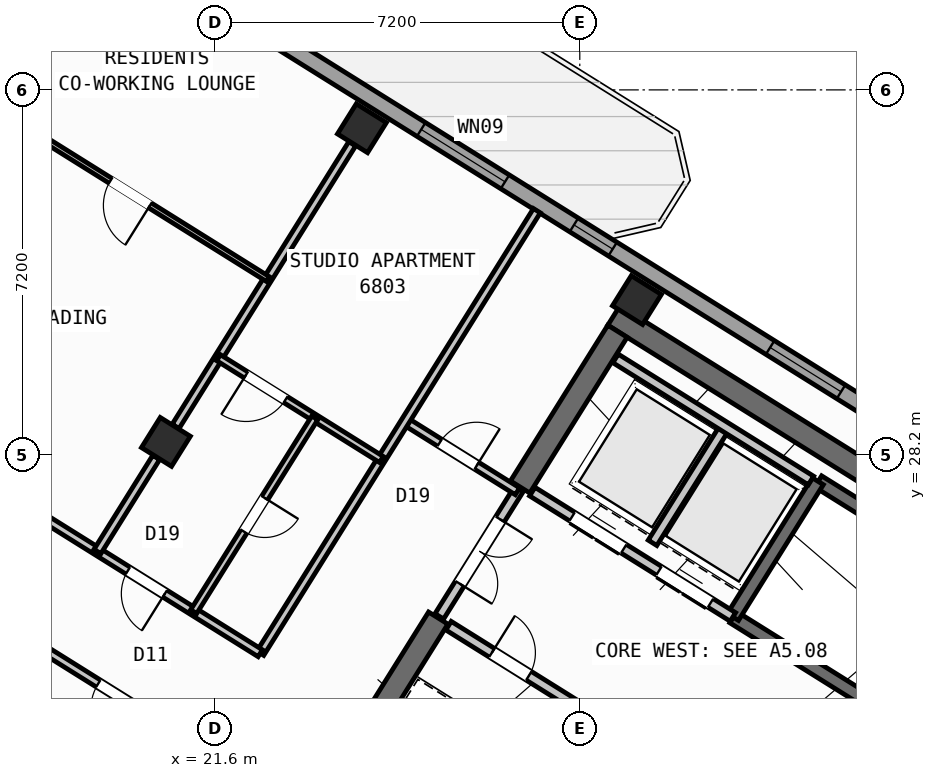
"""IFC4 building model, lengths in metres.
Left out: names, types, materials, properties, quantities, classifications, styles, units other than length and angle.
Written with IfcOpenShell. Run it as: python <this file> out.ifc"""

import sys

from ifc_helpers import new_model, si_unit, direction, frame, frame_2d, origin, origin_2d, place, context, subcontext, project, spatial, rectangle, hollow_rectangle, extrude, source, transform, mapped, element, fill, save


model = new_model("IFC4")
c1 = context("Model", 3, precision=1e-05, world=origin(), true_north=direction((0.0, 1.0)))
c2 = subcontext(c1, "Body", "Model", "MODEL_VIEW")
j1 = project(units=[si_unit("LENGTHUNIT", "METRE"), si_unit("PLANEANGLEUNIT", "RADIAN")], contexts=[c1])
p1 = place(None, origin())
s1 = spatial("IfcSite", under=j1, at=p1, CompositionType="ELEMENT")
p2 = place(p1, origin())
s2 = spatial("IfcBuilding", under=s1, at=p2, CompositionType="ELEMENT")
p3 = place(p2, frame((0.0, 0.0, 270.0)))
s3 = spatial("IfcBuildingStorey", under=s2, at=p3, CompositionType="ELEMENT", Elevation=270.0)
p4 = place(p3, frame((40.531, 24.036, 0.0), z_axis=(0.0, 0.0, 1.0), x_axis=(-0.848048787466, 0.529918157905, 0.0)))
e1 = element("IfcWall", 1, at=p4, inside=s3, PredefinedType="SHEAR", context=c2, shape_type="SweptSolid", body=[
    extrude(rectangle(XDim=13.04, YDim=0.45, at=frame_2d((6.52, 0.0))), origin(), (0.0, 0.0, 1.0), 3.35),
])
p5 = place(p3, frame((29.544, 30.636, 0.0), z_axis=(0.0, 0.0, 1.0), x_axis=(-0.529902075036, -0.848058836916, 0.0)))
e2 = element("IfcWall", 2, at=p5, inside=s3, PredefinedType="SHEAR", context=c2, shape_type="SweptSolid", body=[
    extrude(rectangle(XDim=3.625, YDim=0.45, at=frame_2d((1.812, 0.0))), origin(), (0.0, 0.0, 1.0), 3.35),
])
p6 = place(p3, frame((26.007, 24.976, 0.0), z_axis=(0.0, 0.0, 1.0), x_axis=(-0.529931155655, -0.848040665456, 0.0)))
e3 = element("IfcWall", 3, at=p6, inside=s3, PredefinedType="SHEAR", context=c2, shape_type="SweptSolid", body=[
    extrude(rectangle(XDim=6.475, YDim=0.45, at=frame_2d((3.238, 0.0))), origin(), (0.0, 0.0, 1.0), 3.35),
])
m1 = source(origin(), c2, "Body", "SweptSolid", [
    extrude(hollow_rectangle(XDim=0.7, YDim=0.7, WallThickness=0.028, at=origin_2d()), origin(), (0.0, 0.0, 1.0), 3.6),
])
for number, where, z_axis, x_axis in (
    (4, (29.928, 31.251, 0.0), (0.0, 0.0, 1.0), (-0.848, 0.53, 0.0)),
    (5, (24.5, 34.643, 0.0), (0.0, 0.0, 1.0), (-0.848, 0.53, 0.0)),
    (6, (20.632, 28.452, 0.0), (0.0, 0.0, 1.0), (-0.848, 0.53, 0.0)),
):
    element("IfcColumn", number, at=place(p3, frame(where, z_axis=z_axis, x_axis=x_axis)), inside=s3, PredefinedType="COLUMN", context=c2, shape_type="MappedRepresentation", body=[
        mapped(m1, transform((0.0, 0.0, 0.0), scale=1.0)),
    ])
p7 = place(p3, frame((14.138, 41.825, 0.0), z_axis=(0.0, 0.0, 1.0), x_axis=(0.848046498049, -0.529921821731, 0.0)))
e7 = element("IfcWall", 7, at=p7, inside=s3, PredefinedType="STANDARD", context=c2, shape_type="SweptSolid", body=[
    extrude(rectangle(XDim=31.588, YDim=0.32, at=frame_2d((15.794, 0.0))), origin(), (0.0, 0.0, 1.0), 3.35),
])
p8 = place(p7, frame((3.46, 0.0, 0.0)))
e8 = element("IfcOpeningElement", 8, at=p8, cuts=e7, PredefinedType="OPENING", context=c2, shape_type="SweptSolid", body=[
    extrude(rectangle(XDim=1.05, YDim=2.15, at=frame_2d((0.525, 1.075))), frame((0.0, 0.17, 0.0), z_axis=(0.0, -1.0, 0.0), x_axis=(1.0, 0.0, 0.0)), (0.0, 0.0, 1.0), 0.34),
])
p9 = place(p7, frame((0.831, 0.0, 1.0)))
e9 = element("IfcOpeningElement", 9, at=p9, cuts=e7, PredefinedType="OPENING", context=c2, shape_type="SweptSolid", body=[
    extrude(rectangle(XDim=0.9, YDim=1.25, at=frame_2d((0.45, 0.625))), frame((0.0, 0.17, 0.0), z_axis=(0.0, -1.0, 0.0), x_axis=(1.0, 0.0, 0.0)), (0.0, 0.0, 1.0), 0.34),
])
p10 = place(p7, frame((8.719, 0.0, 0.9)))
e10 = element("IfcOpeningElement", 10, at=p10, cuts=e7, PredefinedType="OPENING", context=c2, shape_type="SweptSolid", body=[
    extrude(rectangle(XDim=1.35, YDim=1.45, at=frame_2d((0.675, 0.725))), frame((0.0, 0.17, 0.0), z_axis=(0.0, -1.0, 0.0), x_axis=(1.0, 0.0, 0.0)), (0.0, 0.0, 1.0), 0.34),
])
p11 = place(p7, frame((13.599, 0.0, 0.95)))
e11 = element("IfcOpeningElement", 11, at=p11, cuts=e7, PredefinedType="OPENING", context=c2, shape_type="SweptSolid", body=[
    extrude(rectangle(XDim=1.95, YDim=1.35, at=frame_2d((0.975, 0.675))), frame((0.0, 0.17, 0.0), z_axis=(0.0, -1.0, 0.0), x_axis=(1.0, 0.0, 0.0)), (0.0, 0.0, 1.0), 0.34),
])
p12 = place(p7, frame((17.154, 0.0, 1.0)))
e12 = element("IfcOpeningElement", 12, at=p12, cuts=e7, PredefinedType="OPENING", context=c2, shape_type="SweptSolid", body=[
    extrude(rectangle(XDim=0.9, YDim=1.25, at=frame_2d((0.45, 0.625))), frame((0.0, 0.17, 0.0), z_axis=(0.0, -1.0, 0.0), x_axis=(1.0, 0.0, 0.0)), (0.0, 0.0, 1.0), 0.34),
])
p13 = place(p7, frame((21.719, 0.0, 0.9)))
e13 = element("IfcOpeningElement", 13, at=p13, cuts=e7, PredefinedType="OPENING", context=c2, shape_type="SweptSolid", body=[
    extrude(rectangle(XDim=1.65, YDim=1.45, at=frame_2d((0.825, 0.725))), frame((0.0, 0.17, 0.0), z_axis=(0.0, -1.0, 0.0), x_axis=(1.0, 0.0, 0.0)), (0.0, 0.0, 1.0), 0.34),
])
p14 = place(p7, frame((27.419, 0.0, 0.9)))
e14 = element("IfcOpeningElement", 14, at=p14, cuts=e7, PredefinedType="OPENING", context=c2, shape_type="SweptSolid", body=[
    extrude(rectangle(XDim=1.65, YDim=1.45, at=frame_2d((0.825, 0.725))), frame((0.0, 0.17, 0.0), z_axis=(0.0, -1.0, 0.0), x_axis=(1.0, 0.0, 0.0)), (0.0, 0.0, 1.0), 0.34),
])
p15 = place(p3, frame((39.721, 23.788, 0.0), z_axis=(0.0, 0.0, 1.0), x_axis=(-0.848054434086, 0.529909121291, 0.0)))
e15 = element("IfcWall", 15, at=p15, inside=s3, PredefinedType="SHEAR", context=c2, shape_type="SweptSolid", body=[
    extrude(rectangle(XDim=7.33, YDim=0.26, at=frame_2d((3.665, 0.0))), origin(), (0.0, 0.0, 1.0), 3.35),
])
p16 = place(p3, frame((38.046, 21.108, 0.0), z_axis=(0.0, 0.0, 1.0), x_axis=(-0.848054434086, 0.529909121291, 0.0)))
e16 = element("IfcWall", 16, at=p16, inside=s3, PredefinedType="SHEAR", context=c2, shape_type="SweptSolid", body=[
    extrude(rectangle(XDim=7.33, YDim=0.26, at=frame_2d((3.665, 0.0))), origin(), (0.0, 0.0, 1.0), 3.35),
])
p17 = place(p16, frame((0.22, 0.0, 0.0)))
e17 = element("IfcOpeningElement", 17, at=p17, cuts=e16, PredefinedType="OPENING", context=c2, shape_type="SweptSolid", body=[
    extrude(rectangle(XDim=1.1, YDim=2.1, at=frame_2d((0.55, 1.05))), frame((0.0, 0.14, 0.0), z_axis=(0.0, -1.0, 0.0), x_axis=(1.0, 0.0, 0.0)), (0.0, 0.0, 1.0), 0.28),
])
p18 = place(p3, frame((33.496, 27.677, 0.0), z_axis=(0.0, 0.0, 1.0), x_axis=(-0.529908658664, -0.84805472316, 0.0)))
e18 = element("IfcWall", 18, at=p18, inside=s3, PredefinedType="SHEAR", context=c2, shape_type="SweptSolid", body=[
    extrude(rectangle(XDim=3.16, YDim=0.26, at=frame_2d((1.58, 0.0))), origin(), (0.0, 0.0, 1.0), 3.35),
])
p19 = place(p3, frame((31.822, 24.998, 0.0), z_axis=(0.0, 0.0, 1.0), x_axis=(-0.848054125777, 0.529909614701, 0.0)))
e19 = element("IfcWall", 19, at=p19, inside=s3, PredefinedType="STANDARD", context=c2, shape_type="SweptSolid", body=[
    extrude(rectangle(XDim=4.668, YDim=0.2, at=frame_2d((2.334, 0.0))), origin(), (0.0, 0.0, 1.0), 3.34),
])
p20 = place(p19, frame((0.52, 0.0, 0.0)))
e20 = element("IfcOpeningElement", 20, at=p20, cuts=e19, PredefinedType="OPENING", context=c2, shape_type="SweptSolid", body=[
    extrude(rectangle(XDim=1.2, YDim=2.15, at=frame_2d((0.6, 1.075))), frame((0.0, 0.11, 0.0), z_axis=(0.0, -1.0, 0.0), x_axis=(1.0, 0.0, 0.0)), (0.0, 0.0, 1.0), 0.22),
])
p21 = place(p19, frame((2.54, 0.0, 0.0)))
e21 = element("IfcOpeningElement", 21, at=p21, cuts=e19, PredefinedType="OPENING", context=c2, shape_type="SweptSolid", body=[
    extrude(rectangle(XDim=1.2, YDim=2.15, at=frame_2d((0.6, 1.075))), frame((0.0, 0.11, 0.0), z_axis=(0.0, -1.0, 0.0), x_axis=(1.0, 0.0, 0.0)), (0.0, 0.0, 1.0), 0.22),
])
p22 = place(p3, frame((31.645, 28.716, 0.0), z_axis=(0.0, 0.0, 1.0), x_axis=(-0.52986693015, -0.848080795876, 0.0)))
e22 = element("IfcWall", 22, at=p22, inside=s3, PredefinedType="STANDARD", context=c2, shape_type="SweptSolid", body=[
    extrude(rectangle(XDim=2.66, YDim=0.2, at=frame_2d((1.33, 0.0))), origin(), (0.0, 0.0, 1.0), 3.34),
])
p23 = place(p3, frame((33.363, 27.69, 0.0), z_axis=(0.0, 0.0, 1.0), x_axis=(-0.84804957148, 0.529916903215, 0.0)))
e23 = element("IfcWall", 23, at=p23, inside=s3, PredefinedType="STANDARD", context=c2, shape_type="SweptSolid", body=[
    extrude(rectangle(XDim=4.548, YDim=0.2, at=frame_2d((2.274, 0.0))), origin(), (0.0, 0.0, 1.0), 3.34),
])
p24 = place(p3, frame((31.525, 21.504, 0.0), z_axis=(0.0, 0.0, 1.0), x_axis=(-0.848042066329, 0.529928913853, 0.0)))
e24 = element("IfcWall", 24, at=p24, inside=s3, PredefinedType="STANDARD", context=c2, shape_type="SweptSolid", body=[
    extrude(rectangle(XDim=6.268, YDim=0.2, at=frame_2d((3.134, 0.0))), origin(), (0.0, 0.0, 1.0), 3.34),
])
p25 = place(p24, frame((4.4, 0.0, 0.0)))
e25 = element("IfcOpeningElement", 25, at=p25, cuts=e24, PredefinedType="OPENING", context=c2, shape_type="SweptSolid", body=[
    extrude(rectangle(XDim=0.86, YDim=2.05, at=frame_2d((0.43, 1.025))), frame((0.0, 0.11, 0.0), z_axis=(0.0, -1.0, 0.0), x_axis=(1.0, 0.0, 0.0)), (0.0, 0.0, 1.0), 0.22),
])
p26 = place(p24, frame((0.35, 0.0, 0.0)))
e26 = element("IfcOpeningElement", 26, at=p26, cuts=e24, PredefinedType="OPENING", context=c2, shape_type="SweptSolid", body=[
    extrude(rectangle(XDim=0.86, YDim=2.05, at=frame_2d((0.43, 1.025))), frame((0.0, 0.11, 0.0), z_axis=(0.0, -1.0, 0.0), x_axis=(1.0, 0.0, 0.0)), (0.0, 0.0, 1.0), 0.22),
])
p27 = place(p3, frame((27.596, 27.52, 0.0), z_axis=(0.0, 0.0, 1.0), x_axis=(-0.529865479138, -0.848081702443, 0.0)))
e27 = element("IfcWall", 27, at=p27, inside=s3, PredefinedType="STANDARD", context=c2, shape_type="SweptSolid", body=[
    extrude(rectangle(XDim=2.96, YDim=0.2, at=frame_2d((1.48, 0.0))), origin(), (0.0, 0.0, 1.0), 3.34),
])
p28 = place(p27, frame((0.7, 0.0, 0.0)))
e28 = element("IfcOpeningElement", 28, at=p28, cuts=e27, PredefinedType="OPENING", context=c2, shape_type="SweptSolid", body=[
    extrude(rectangle(XDim=1.5, YDim=2.15, at=frame_2d((0.75, 1.075))), frame((0.0, 0.11, 0.0), z_axis=(0.0, -1.0, 0.0), x_axis=(1.0, 0.0, 0.0)), (0.0, 0.0, 1.0), 0.22),
])
p29 = place(p3, frame((27.57, 27.478, 0.0), z_axis=(0.0, 0.0, 1.0), x_axis=(-0.848050851465, 0.529914854792, 0.0)))
e29 = element("IfcWall", 29, at=p29, inside=s3, PredefinedType="PARTITIONING", context=c2, shape_type="SweptSolid", body=[
    extrude(rectangle(XDim=2.61, YDim=0.16, at=frame_2d((1.305, 0.0))), origin(), (0.0, 0.0, 1.0), 3.34),
])
p30 = place(p29, frame((0.95, 0.0, 0.0)))
e30 = element("IfcOpeningElement", 30, at=p30, cuts=e29, PredefinedType="OPENING", context=c2, shape_type="SweptSolid", body=[
    extrude(rectangle(XDim=0.86, YDim=2.05, at=frame_2d((0.43, 1.025))), frame((0.0, 0.09, 0.0), z_axis=(0.0, -1.0, 0.0), x_axis=(1.0, 0.0, 0.0)), (0.0, 0.0, 1.0), 0.18),
])
p31 = place(p3, frame((27.953, 33.016, 0.0), z_axis=(0.0, 0.0, 1.0), x_axis=(-0.529909450694, -0.848054228257, 0.0)))
e31 = element("IfcWall", 31, at=p31, inside=s3, PredefinedType="PARTITIONING", context=c2, shape_type="SweptSolid", body=[
    extrude(rectangle(XDim=10.3, YDim=0.16, at=frame_2d((5.15, 0.0))), origin(), (0.0, 0.0, 1.0), 3.34),
])
p32 = place(p3, frame((22.495, 24.281, 0.0), z_axis=(0.0, 0.0, 1.0), x_axis=(-0.848052408131, 0.529912363569, 0.0)))
e32 = element("IfcWall", 32, at=p32, inside=s3, PredefinedType="PARTITIONING", context=c2, shape_type="SweptSolid", body=[
    extrude(rectangle(XDim=16.73, YDim=0.16, at=frame_2d((8.365, 0.0))), origin(), (0.0, 0.0, 1.0), 3.34),
])
p33 = place(p32, frame((2.22, 0.0, 0.0)))
e33 = element("IfcOpeningElement", 33, at=p33, cuts=e32, PredefinedType="OPENING", context=c2, shape_type="SweptSolid", body=[
    extrude(rectangle(XDim=0.86, YDim=2.05, at=frame_2d((0.43, 1.025))), frame((0.0, 0.09, 0.0), z_axis=(0.0, -1.0, 0.0), x_axis=(1.0, 0.0, 0.0)), (0.0, 0.0, 1.0), 0.18),
])
p34 = place(p32, frame((6.49, 0.0, 0.0)))
e34 = element("IfcOpeningElement", 34, at=p34, cuts=e32, PredefinedType="OPENING", context=c2, shape_type="SweptSolid", body=[
    extrude(rectangle(XDim=1.0, YDim=2.1, at=frame_2d((0.5, 1.05))), frame((0.0, 0.09, 0.0), z_axis=(0.0, -1.0, 0.0), x_axis=(1.0, 0.0, 0.0)), (0.0, 0.0, 1.0), 0.18),
])
p35 = place(p32, frame((14.76, 0.0, 0.0)))
e35 = element("IfcOpeningElement", 35, at=p35, cuts=e32, PredefinedType="OPENING", context=c2, shape_type="SweptSolid", body=[
    extrude(rectangle(XDim=1.0, YDim=2.1, at=frame_2d((0.5, 1.05))), frame((0.0, 0.09, 0.0), z_axis=(0.0, -1.0, 0.0), x_axis=(1.0, 0.0, 0.0)), (0.0, 0.0, 1.0), 0.18),
])
p36 = place(p3, frame((21.329, 22.416, 0.0), z_axis=(0.0, 0.0, 1.0), x_axis=(-0.848052408131, 0.529912363569, 0.0)))
e36 = element("IfcWall", 36, at=p36, inside=s3, PredefinedType="PARTITIONING", context=c2, shape_type="SweptSolid", body=[
    extrude(rectangle(XDim=16.73, YDim=0.16, at=frame_2d((8.365, 0.0))), origin(), (0.0, 0.0, 1.0), 3.34),
])
p37 = place(p36, frame((1.395, 0.0, 0.0)))
e37 = element("IfcOpeningElement", 37, at=p37, cuts=e36, PredefinedType="OPENING", context=c2, shape_type="SweptSolid", body=[
    extrude(rectangle(XDim=1.0, YDim=2.1, at=frame_2d((0.5, 1.05))), frame((0.0, 0.09, 0.0), z_axis=(0.0, -1.0, 0.0), x_axis=(1.0, 0.0, 0.0)), (0.0, 0.0, 1.0), 0.18),
])
p38 = place(p36, frame((7.82, 0.0, 0.0)))
e38 = element("IfcOpeningElement", 38, at=p38, cuts=e36, PredefinedType="OPENING", context=c2, shape_type="SweptSolid", body=[
    extrude(rectangle(XDim=1.0, YDim=2.1, at=frame_2d((0.5, 1.05))), frame((0.0, 0.09, 0.0), z_axis=(0.0, -1.0, 0.0), x_axis=(1.0, 0.0, 0.0)), (0.0, 0.0, 1.0), 0.18),
])
p39 = place(p36, frame((11.14, 0.0, 0.0)))
e39 = element("IfcOpeningElement", 39, at=p39, cuts=e36, PredefinedType="OPENING", context=c2, shape_type="SweptSolid", body=[
    extrude(rectangle(XDim=1.0, YDim=2.1, at=frame_2d((0.5, 1.05))), frame((0.0, 0.09, 0.0), z_axis=(0.0, -1.0, 0.0), x_axis=(1.0, 0.0, 0.0)), (0.0, 0.0, 1.0), 0.18),
])
p40 = place(p3, frame((24.309, 34.336, 0.0), z_axis=(0.0, 0.0, 1.0), x_axis=(-0.529895484599, -0.848062954858, 0.0)))
e40 = element("IfcWall", 40, at=p40, inside=s3, PredefinedType="PARTITIONING", context=c2, shape_type="SweptSolid", body=[
    extrude(rectangle(XDim=6.576, YDim=0.16, at=frame_2d((3.288, 0.0))), origin(), (0.0, 0.0, 1.0), 2.875),
])
p41 = place(p3, frame((20.44, 28.145, 0.0), z_axis=(0.0, 0.0, 1.0), x_axis=(-0.5299186965, -0.848048450915, 0.0)))
e41 = element("IfcWall", 41, at=p41, inside=s3, PredefinedType="PARTITIONING", context=c2, shape_type="SweptSolid", body=[
    extrude(rectangle(XDim=2.188, YDim=0.16, at=frame_2d((1.094, 0.0))), origin(), (0.0, 0.0, 1.0), 2.875),
])
p42 = place(p3, frame((24.885, 28.106, 0.0), z_axis=(0.0, 0.0, 1.0), x_axis=(-0.848059820872, 0.529900500304, 0.0)))
e42 = element("IfcWall", 42, at=p42, inside=s3, PredefinedType="PLUMBINGWALL", context=c2, shape_type="SweptSolid", body=[
    extrude(rectangle(XDim=3.79, YDim=0.14, at=frame_2d((1.895, 0.0))), origin(), (0.0, 0.0, 1.0), 3.34),
])
p43 = place(p42, frame((2.23, 0.0, 0.0)))
e43 = element("IfcOpeningElement", 43, at=p43, cuts=e42, PredefinedType="OPENING", context=c2, shape_type="SweptSolid", body=[
    extrude(rectangle(XDim=0.92, YDim=2.08, at=frame_2d((0.46, 1.04))), frame((0.0, 0.08, 0.0), z_axis=(0.0, -1.0, 0.0), x_axis=(1.0, 0.0, 0.0)), (0.0, 0.0, 1.0), 0.16),
])
p44 = place(p3, frame((23.57, 28.927, 0.0), z_axis=(0.0, 0.0, 1.0), x_axis=(-0.529911350634, -0.84805304107, 0.0)))
e44 = element("IfcWall", 44, at=p44, inside=s3, PredefinedType="PLUMBINGWALL", context=c2, shape_type="SweptSolid", body=[
    extrude(rectangle(XDim=4.51, YDim=0.14, at=frame_2d((2.255, 0.0))), origin(), (0.0, 0.0, 1.0), 3.025),
])
p45 = place(p44, frame((1.865, 0.0, 0.0)))
e45 = element("IfcOpeningElement", 45, at=p45, cuts=e44, PredefinedType="OPENING", context=c2, shape_type="SweptSolid", body=[
    extrude(rectangle(XDim=0.78, YDim=2.05, at=frame_2d((0.39, 1.025))), frame((0.0, 0.08, 0.0), z_axis=(0.0, -1.0, 0.0), x_axis=(1.0, 0.0, 0.0)), (0.0, 0.0, 1.0), 0.16),
])
p46 = place(p3, frame((18.881, 37.727, 0.0), z_axis=(0.0, 0.0, 1.0), x_axis=(-0.529938869374, -0.84803584519, 0.0)))
e46 = element("IfcWall", 46, at=p46, inside=s3, PredefinedType="PARTITIONING", context=c2, shape_type="SweptSolid", body=[
    extrude(rectangle(XDim=6.576, YDim=0.16, at=frame_2d((3.288, 0.0))), origin(), (0.0, 0.0, 1.0), 2.875),
])
p47 = place(p3, frame((22.642, 31.668, 0.0), z_axis=(0.0, 0.0, 1.0), x_axis=(-0.84806687439, 0.529889211593, 0.0)))
e47 = element("IfcWall", 47, at=p47, inside=s3, PredefinedType="PARTITIONING", context=c2, shape_type="SweptSolid", body=[
    extrude(rectangle(XDim=6.4, YDim=0.11, at=frame_2d((3.2, 0.0))), origin(), (0.0, 0.0, 1.0), 3.34),
])
p48 = place(p47, frame((2.74, 0.0, 0.0)))
e48 = element("IfcOpeningElement", 48, at=p48, cuts=e47, PredefinedType="OPENING", context=c2, shape_type="SweptSolid", body=[
    extrude(rectangle(XDim=0.92, YDim=2.08, at=frame_2d((0.46, 1.04))), frame((0.0, 0.065, 0.0), z_axis=(0.0, -1.0, 0.0), x_axis=(1.0, 0.0, 0.0)), (0.0, 0.0, 1.0), 0.13),
])
m2 = source(origin(), c2, "Body", "SweptSolid", [
    extrude(rectangle(XDim=1.95, YDim=1.35, at=frame_2d((0.975, 0.675))), frame((0.0, 0.03, 0.0), z_axis=(0.0, -1.0, 0.0), x_axis=(1.0, 0.0, 0.0)), (0.0, 0.0, 1.0), 0.06),
])
p49 = place(p11, origin())
e49 = element("IfcWindow", 49, at=p49, inside=s3, PartitioningType="SINGLE_PANEL", PredefinedType="WINDOW", context=c2, shape_type="MappedRepresentation", body=[
    mapped(m2, transform((0.0, 0.0, 0.0), scale=1.0)),
])
fill(e11, e49)
m3 = source(origin(), c2, "Body", "SweptSolid", [
    extrude(rectangle(XDim=0.9, YDim=1.25, at=frame_2d((0.45, 0.625))), frame((0.0, 0.03, 0.0), z_axis=(0.0, -1.0, 0.0), x_axis=(1.0, 0.0, 0.0)), (0.0, 0.0, 1.0), 0.06),
])
p50 = place(p12, origin())
e50 = element("IfcWindow", 50, at=p50, inside=s3, PartitioningType="SINGLE_PANEL", PredefinedType="WINDOW", context=c2, shape_type="MappedRepresentation", body=[
    mapped(m3, transform((0.0, 0.0, 0.0), scale=1.0)),
])
fill(e12, e50)
m4 = source(origin(), c2, "Body", "SweptSolid", [
    extrude(rectangle(XDim=1.65, YDim=1.45, at=frame_2d((0.825, 0.725))), frame((0.0, 0.03, 0.0), z_axis=(0.0, -1.0, 0.0), x_axis=(1.0, 0.0, 0.0)), (0.0, 0.0, 1.0), 0.06),
])
p51 = place(p13, origin())
e51 = element("IfcWindow", 51, at=p51, inside=s3, PartitioningType="SINGLE_PANEL", PredefinedType="WINDOW", context=c2, shape_type="MappedRepresentation", body=[
    mapped(m4, transform((0.0, 0.0, 0.0), scale=1.0)),
])
fill(e13, e51)
m5 = source(origin(), c2, "Body", "SweptSolid", [
    extrude(rectangle(XDim=1.2, YDim=2.15, at=frame_2d((0.6, 1.075))), frame((0.0, 0.025, 0.0), z_axis=(0.0, -1.0, 0.0), x_axis=(1.0, 0.0, 0.0)), (0.0, 0.0, 1.0), 0.05),
])
p52 = place(p20, origin())
e52 = element("IfcDoor", 52, at=p52, inside=s3, OperationType="DOUBLE_DOOR_SLIDING", PredefinedType="DOOR", context=c2, shape_type="MappedRepresentation", body=[
    mapped(m5, transform((0.0, 0.0, 0.0), scale=1.0)),
])
fill(e20, e52)
p53 = place(p21, origin())
e53 = element("IfcDoor", 53, at=p53, inside=s3, OperationType="DOUBLE_DOOR_SLIDING", PredefinedType="DOOR", context=c2, shape_type="MappedRepresentation", body=[
    mapped(m5, transform((0.0, 0.0, 0.0), scale=1.0)),
])
fill(e21, e53)
m6 = source(origin(), c2, "Body", "SweptSolid", [
    extrude(rectangle(XDim=0.86, YDim=2.05, at=frame_2d((0.43, 1.025))), frame((0.0, 0.025, 0.0), z_axis=(0.0, -1.0, 0.0), x_axis=(1.0, 0.0, 0.0)), (0.0, 0.0, 1.0), 0.05),
])
p54 = place(p25, frame((0.86, 0.0, 0.0), z_axis=(0.0, 0.0, 1.0), x_axis=(-1.0, 0.0, 0.0)))
e54 = element("IfcDoor", 54, at=p54, inside=s3, OperationType="SINGLE_SWING_LEFT", PredefinedType="DOOR", context=c2, shape_type="MappedRepresentation", body=[
    mapped(m6, transform((0.0, 0.0, 0.0), scale=1.0)),
])
fill(e25, e54)
p55 = place(p30, frame((0.86, 0.0, 0.0), z_axis=(0.0, 0.0, 1.0), x_axis=(-1.0, 0.0, 0.0)))
e55 = element("IfcDoor", 55, at=p55, inside=s3, OperationType="SINGLE_SWING_RIGHT", PredefinedType="DOOR", context=c2, shape_type="MappedRepresentation", body=[
    mapped(m6, transform((0.0, 0.0, 0.0), scale=1.0)),
])
fill(e30, e55)
m7 = source(origin(), c2, "Body", "SweptSolid", [
    extrude(rectangle(XDim=1.5, YDim=2.15, at=frame_2d((0.75, 1.075))), frame((0.0, 0.025, 0.0), z_axis=(0.0, -1.0, 0.0), x_axis=(1.0, 0.0, 0.0)), (0.0, 0.0, 1.0), 0.05),
])
p56 = place(p28, origin())
e56 = element("IfcDoor", 56, at=p56, inside=s3, OperationType="DOUBLE_DOOR_SINGLE_SWING", PredefinedType="DOOR", context=c2, shape_type="MappedRepresentation", body=[
    mapped(m7, transform((0.0, 0.0, 0.0), scale=1.0)),
])
fill(e28, e56)
m8 = source(origin(), c2, "Body", "SweptSolid", [
    extrude(rectangle(XDim=1.0, YDim=2.1, at=frame_2d((0.5, 1.05))), frame((0.0, 0.025, 0.0), z_axis=(0.0, -1.0, 0.0), x_axis=(1.0, 0.0, 0.0)), (0.0, 0.0, 1.0), 0.05),
])
p57 = place(p37, origin())
e57 = element("IfcDoor", 57, at=p57, inside=s3, OperationType="SINGLE_SWING_LEFT", PredefinedType="DOOR", context=c2, shape_type="MappedRepresentation", body=[
    mapped(m8, transform((0.0, 0.0, 0.0), scale=1.0)),
])
fill(e37, e57)
p58 = place(p33, origin())
e58 = element("IfcDoor", 58, at=p58, inside=s3, OperationType="SINGLE_SWING_LEFT", PredefinedType="DOOR", context=c2, shape_type="MappedRepresentation", body=[
    mapped(m6, transform((0.0, 0.0, 0.0), scale=1.0)),
])
fill(e33, e58)
m9 = source(origin(), c2, "Body", "SweptSolid", [
    extrude(rectangle(XDim=0.92, YDim=2.08, at=frame_2d((0.46, 1.04))), frame((0.0, 0.025, 0.0), z_axis=(0.0, -1.0, 0.0), x_axis=(1.0, 0.0, 0.0)), (0.0, 0.0, 1.0), 0.05),
])
p59 = place(p43, origin())
e59 = element("IfcDoor", 59, at=p59, inside=s3, OperationType="SINGLE_SWING_RIGHT", PredefinedType="DOOR", context=c2, shape_type="MappedRepresentation", body=[
    mapped(m9, transform((0.0, 0.0, 0.0), scale=1.0)),
])
fill(e43, e59)
m10 = source(origin(), c2, "Body", "SweptSolid", [
    extrude(rectangle(XDim=0.78, YDim=2.05, at=frame_2d((0.39, 1.025))), frame((0.0, 0.025, 0.0), z_axis=(0.0, -1.0, 0.0), x_axis=(1.0, 0.0, 0.0)), (0.0, 0.0, 1.0), 0.05),
])
p60 = place(p45, origin())
e60 = element("IfcDoor", 60, at=p60, inside=s3, OperationType="SINGLE_SWING_LEFT", PredefinedType="DOOR", context=c2, shape_type="MappedRepresentation", body=[
    mapped(m10, transform((0.0, 0.0, 0.0), scale=1.0)),
])
fill(e45, e60)
p61 = place(p48, origin())
e61 = element("IfcDoor", 61, at=p61, inside=s3, OperationType="SINGLE_SWING_LEFT", PredefinedType="DOOR", context=c2, shape_type="MappedRepresentation", body=[
    mapped(m9, transform((0.0, 0.0, 0.0), scale=1.0)),
])
fill(e48, e61)
save(model, sys.argv[1])
